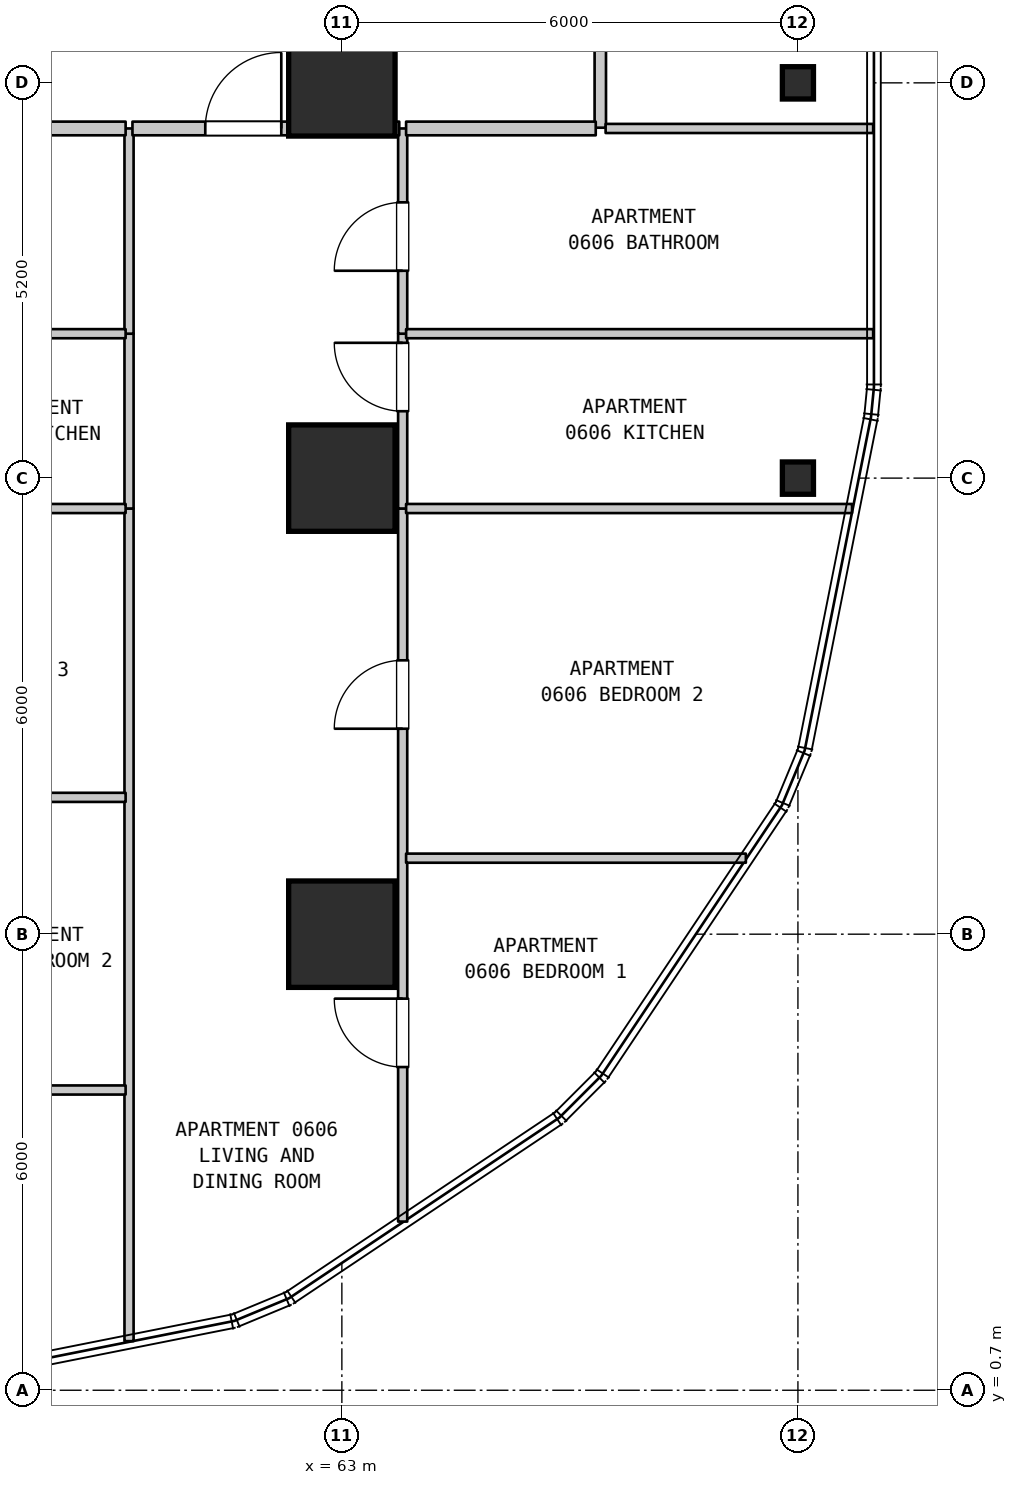
"""IFC4 building model, lengths in metres.
Left out: names, types, materials, properties, quantities, classifications, styles, units other than length and angle.
Written with IfcOpenShell. Run it as: python <this file> out.ifc"""

import sys

from ifc_helpers import new_model, si_unit, direction, frame, frame_2d, origin, origin_2d, place, context, subcontext, project, spatial, rectangle, i_section, extrude, element, fill, save


model = new_model("IFC4")
c1 = context("Model", 3, precision=1e-05, world=origin(), true_north=direction((0.0, 1.0)))
c2 = subcontext(c1, "Body", "Model", "MODEL_VIEW")
j1 = project(units=[si_unit("LENGTHUNIT", "METRE"), si_unit("PLANEANGLEUNIT", "RADIAN")], contexts=[c1])
p1 = place(None, origin())
s1 = spatial("IfcSite", under=j1, at=p1, CompositionType="ELEMENT")
p2 = place(p1, origin())
s2 = spatial("IfcBuilding", under=s1, at=p2, CompositionType="ELEMENT")
p3 = place(p2, frame((0.0, 0.0, 31.4)))
s3 = spatial("IfcBuildingStorey", under=s2, at=p3, CompositionType="ELEMENT", Elevation=31.4)
for number, where, z_axis, x_axis in (
    (1, (63.0, 6.7, 0.0), (0.0, 0.0, 1.0), (1.0, 0.0, 0.0)),
    (2, (63.0, 12.7, 0.0), (0.0, 0.0, 1.0), (1.0, 0.0, 0.0)),
    (3, (63.0, 17.9, 0.0), (0.0, 0.0, 1.0), (1.0, 0.0, 0.0)),
):
    element("IfcColumn", number, at=place(p3, frame(where, z_axis=z_axis, x_axis=x_axis)), inside=s3, PredefinedType="COLUMN", context=c2, shape_type="SweptSolid", body=[
        extrude(rectangle(XDim=1.4, YDim=1.4, at=origin_2d()), origin(), (0.0, 0.0, 1.0), 3.7),
    ])
for number, where, z_axis, x_axis in (
    (4, (69.0, 12.7, 0.0), (0.0, 0.0, 1.0), (1.0, 0.0, 0.0)),
    (5, (69.0, 17.9, 0.0), (0.0, 0.0, 1.0), (1.0, 0.0, 0.0)),
):
    element("IfcColumn", number, at=place(p3, frame(where, z_axis=z_axis, x_axis=x_axis)), inside=s3, PredefinedType="COLUMN", context=c2, shape_type="SweptSolid", body=[
        extrude(i_section(OverallWidth=0.409, OverallDepth=0.425, WebThickness=0.032, FlangeThickness=0.052, FilletRadius=0.015, at=origin_2d()), origin(), (0.0, 0.0, 1.0), 3.7),
    ])
p4 = place(p3, frame((60.2, 1.346, 0.0), z_axis=(0.0, 0.0, 1.0), x_axis=(0.0, 1.0, 0.0)))
e6 = element("IfcWall", 6, at=p4, inside=s3, PredefinedType="PARTITIONING", context=c2, shape_type="SweptSolid", body=[
    extrude(rectangle(XDim=10.954, YDim=0.12, at=frame_2d((5.477, 0.0))), origin(), (0.0, 0.0, 1.0), 3.385),
])
p5 = place(p3, frame((60.2, 12.3, 0.0), z_axis=(0.0, 0.0, 1.0), x_axis=(0.0, 1.0, 0.0)))
e7 = element("IfcWall", 7, at=p5, inside=s3, PredefinedType="PARTITIONING", context=c2, shape_type="SweptSolid", body=[
    extrude(rectangle(XDim=2.3, YDim=0.12, at=frame_2d((1.15, 0.0))), origin(), (0.0, 0.0, 1.0), 3.385),
])
p6 = place(p3, frame((60.2, 14.6, 0.0), z_axis=(0.0, 0.0, 1.0), x_axis=(0.0, 1.0, 0.0)))
e8 = element("IfcWall", 8, at=p6, inside=s3, PredefinedType="PARTITIONING", context=c2, shape_type="SweptSolid", body=[
    extrude(rectangle(XDim=2.7, YDim=0.12, at=frame_2d((1.35, 0.0))), origin(), (0.0, 0.0, 1.0), 3.385),
])
p7 = place(p3, frame((63.8, 2.919, 0.0), z_axis=(0.0, 0.0, 1.0), x_axis=(0.0, 1.0, 0.0)))
e9 = element("IfcWall", 9, at=p7, inside=s3, PredefinedType="PARTITIONING", context=c2, shape_type="SweptSolid", body=[
    extrude(rectangle(XDim=9.381, YDim=0.12, at=frame_2d((4.69, 0.0))), origin(), (0.0, 0.0, 1.0), 3.385),
])
p8 = place(p7, frame((2.033, 0.0, 0.0)))
e10 = element("IfcOpeningElement", 10, at=p8, cuts=e9, PredefinedType="OPENING", context=c2, shape_type="SweptSolid", body=[
    extrude(rectangle(XDim=0.9, YDim=2.15, at=frame_2d((0.45, 1.075))), frame((0.0, 0.07, 0.0), z_axis=(0.0, -1.0, 0.0), x_axis=(1.0, 0.0, 0.0)), (0.0, 0.0, 1.0), 0.14),
])
p9 = place(p7, frame((6.484, 0.0, 0.0)))
e11 = element("IfcOpeningElement", 11, at=p9, cuts=e9, PredefinedType="OPENING", context=c2, shape_type="SweptSolid", body=[
    extrude(rectangle(XDim=0.9, YDim=2.15, at=frame_2d((0.45, 1.075))), frame((0.0, 0.07, 0.0), z_axis=(0.0, -1.0, 0.0), x_axis=(1.0, 0.0, 0.0)), (0.0, 0.0, 1.0), 0.14),
])
p10 = place(p3, frame((63.8, 12.3, 0.0), z_axis=(0.0, 0.0, 1.0), x_axis=(0.0, 1.0, 0.0)))
e12 = element("IfcWall", 12, at=p10, inside=s3, PredefinedType="PARTITIONING", context=c2, shape_type="SweptSolid", body=[
    extrude(rectangle(XDim=2.3, YDim=0.12, at=frame_2d((1.15, 0.0))), origin(), (0.0, 0.0, 1.0), 3.385),
])
p11 = place(p10, frame((1.28, 0.0, 0.0)))
e13 = element("IfcOpeningElement", 13, at=p11, cuts=e12, PredefinedType="OPENING", context=c2, shape_type="SweptSolid", body=[
    extrude(rectangle(XDim=0.9, YDim=2.15, at=frame_2d((0.45, 1.075))), frame((0.0, 0.07, 0.0), z_axis=(0.0, -1.0, 0.0), x_axis=(1.0, 0.0, 0.0)), (0.0, 0.0, 1.0), 0.14),
])
p12 = place(p3, frame((63.8, 14.6, 0.0), z_axis=(0.0, 0.0, 1.0), x_axis=(0.0, 1.0, 0.0)))
e14 = element("IfcWall", 14, at=p12, inside=s3, PredefinedType="PARTITIONING", context=c2, shape_type="SweptSolid", body=[
    extrude(rectangle(XDim=2.7, YDim=0.12, at=frame_2d((1.35, 0.0))), origin(), (0.0, 0.0, 1.0), 3.385),
])
p13 = place(p12, frame((0.828, 0.0, 0.0)))
e15 = element("IfcOpeningElement", 15, at=p13, cuts=e14, PredefinedType="OPENING", context=c2, shape_type="SweptSolid", body=[
    extrude(rectangle(XDim=0.9, YDim=2.1, at=frame_2d((0.45, 1.05))), frame((0.0, 0.07, 0.0), z_axis=(0.0, -1.0, 0.0), x_axis=(1.0, 0.0, 0.0)), (0.0, 0.0, 1.0), 0.14),
])
p14 = place(p3, frame((66.4, 17.31, 0.0), z_axis=(0.0, 0.0, 1.0), x_axis=(0.0, 1.0, 0.0)))
e16 = element("IfcWall", 16, at=p14, inside=s3, PredefinedType="STANDARD", context=c2, shape_type="SweptSolid", body=[
    extrude(rectangle(XDim=2.34, YDim=0.15, at=frame_2d((1.17, 0.0))), origin(), (0.0, 0.0, 1.0), 3.385),
])
p15 = place(p3, frame((54.115, 4.65, 0.0), z_axis=(0.0, 0.0, 1.0), x_axis=(1.0, 0.0, 0.0)))
e17 = element("IfcWall", 17, at=p15, inside=s3, PredefinedType="PARTITIONING", context=c2, shape_type="SweptSolid", body=[
    extrude(rectangle(XDim=6.04, YDim=0.12, at=frame_2d((3.02, 0.0))), origin(), (0.0, 0.0, 1.0), 3.385),
])
p16 = place(p3, frame((63.845, 7.7, 0.0), z_axis=(0.0, 0.0, 1.0), x_axis=(1.0, 0.0, 0.0)))
e18 = element("IfcWall", 18, at=p16, inside=s3, PredefinedType="PARTITIONING", context=c2, shape_type="SweptSolid", body=[
    extrude(rectangle(XDim=4.47, YDim=0.12, at=frame_2d((2.235, 0.0))), origin(), (0.0, 0.0, 1.0), 3.385),
])
for number, where, z_axis, x_axis in (
    (19, (54.115, 8.5, 0.0), (0.0, 0.0, 1.0), (1.0, 0.0, 0.0)),
    (20, (54.115, 12.3, 0.0), (0.0, 0.0, 1.0), (1.0, 0.0, 0.0)),
):
    element("IfcWall", number, at=place(p3, frame(where, z_axis=z_axis, x_axis=x_axis)), inside=s3, PredefinedType="PARTITIONING", context=c2, shape_type="SweptSolid", body=[
        extrude(rectangle(XDim=6.04, YDim=0.12, at=frame_2d((3.02, 0.0))), origin(), (0.0, 0.0, 1.0), 3.385),
    ])
p17 = place(p3, frame((63.845, 12.3, 0.0), z_axis=(0.0, 0.0, 1.0), x_axis=(1.0, 0.0, 0.0)))
e21 = element("IfcWall", 21, at=p17, inside=s3, PredefinedType="PARTITIONING", context=c2, shape_type="SweptSolid", body=[
    extrude(rectangle(XDim=5.867, YDim=0.12, at=frame_2d((2.934, 0.0))), origin(), (0.0, 0.0, 1.0), 3.385),
])
p18 = place(p3, frame((54.115, 14.6, 0.0), z_axis=(0.0, 0.0, 1.0), x_axis=(1.0, 0.0, 0.0)))
e22 = element("IfcWall", 22, at=p18, inside=s3, PredefinedType="PARTITIONING", context=c2, shape_type="SweptSolid", body=[
    extrude(rectangle(XDim=6.04, YDim=0.12, at=frame_2d((3.02, 0.0))), origin(), (0.0, 0.0, 1.0), 3.385),
])
p19 = place(p3, frame((63.845, 14.6, 0.0), z_axis=(0.0, 0.0, 1.0), x_axis=(1.0, 0.0, 0.0)))
e23 = element("IfcWall", 23, at=p19, inside=s3, PredefinedType="PARTITIONING", context=c2, shape_type="SweptSolid", body=[
    extrude(rectangle(XDim=6.145, YDim=0.12, at=frame_2d((3.073, 0.0))), origin(), (0.0, 0.0, 1.0), 3.385),
])
p20 = place(p3, frame((54.115, 17.3, 0.0), z_axis=(0.0, 0.0, 1.0), x_axis=(1.0, 0.0, 0.0)))
e24 = element("IfcWall", 24, at=p20, inside=s3, PredefinedType="STANDARD", context=c2, shape_type="SweptSolid", body=[
    extrude(rectangle(XDim=6.04, YDim=0.18, at=frame_2d((3.02, 0.0))), origin(), (0.0, 0.0, 1.0), 3.385),
])
p21 = place(p3, frame((60.245, 17.3, 0.0), z_axis=(0.0, 0.0, 1.0), x_axis=(1.0, 0.0, 0.0)))
e25 = element("IfcWall", 25, at=p21, inside=s3, PredefinedType="STANDARD", context=c2, shape_type="SweptSolid", body=[
    extrude(rectangle(XDim=3.51, YDim=0.18, at=frame_2d((1.755, 0.0))), origin(), (0.0, 0.0, 1.0), 3.385),
])
p22 = place(p21, frame((0.958, 0.0, 0.0)))
e26 = element("IfcOpeningElement", 26, at=p22, cuts=e25, PredefinedType="OPENING", context=c2, shape_type="SweptSolid", body=[
    extrude(rectangle(XDim=1.0, YDim=2.15, at=frame_2d((0.5, 1.075))), frame((0.0, 0.1, 0.0), z_axis=(0.0, -1.0, 0.0), x_axis=(1.0, 0.0, 0.0)), (0.0, 0.0, 1.0), 0.2),
])
p23 = place(p3, frame((63.845, 17.3, 0.0), z_axis=(0.0, 0.0, 1.0), x_axis=(1.0, 0.0, 0.0)))
e27 = element("IfcWall", 27, at=p23, inside=s3, PredefinedType="STANDARD", context=c2, shape_type="SweptSolid", body=[
    extrude(rectangle(XDim=2.495, YDim=0.18, at=frame_2d((1.248, 0.0))), origin(), (0.0, 0.0, 1.0), 3.385),
])
p24 = place(p3, frame((66.47, 17.3, 0.0), z_axis=(0.0, 0.0, 1.0), x_axis=(1.0, 0.0, 0.0)))
e28 = element("IfcWall", 28, at=p24, inside=s3, PredefinedType="PARTITIONING", context=c2, shape_type="SweptSolid", body=[
    extrude(rectangle(XDim=3.52, YDim=0.12, at=frame_2d((1.76, 0.0))), origin(), (0.0, 0.0, 1.0), 3.385),
])
p25 = place(p8, origin())
e29 = element("IfcDoor", 29, at=p25, inside=s3, OperationType="SINGLE_SWING_RIGHT", PredefinedType="DOOR", context=c2, shape_type="SweptSolid", body=[
    extrude(rectangle(XDim=0.9, YDim=2.15, at=frame_2d((0.45, 1.075))), frame((0.0, 0.025, 0.0), z_axis=(0.0, -1.0, 0.0), x_axis=(1.0, 0.0, 0.0)), (0.0, 0.0, 1.0), 0.05),
])
fill(e10, e29)
p26 = place(p9, origin())
e30 = element("IfcDoor", 30, at=p26, inside=s3, OperationType="SINGLE_SWING_LEFT", PredefinedType="DOOR", context=c2, shape_type="SweptSolid", body=[
    extrude(rectangle(XDim=0.9, YDim=2.15, at=frame_2d((0.45, 1.075))), frame((0.0, 0.025, 0.0), z_axis=(0.0, -1.0, 0.0), x_axis=(1.0, 0.0, 0.0)), (0.0, 0.0, 1.0), 0.05),
])
fill(e11, e30)
p27 = place(p11, origin())
e31 = element("IfcDoor", 31, at=p27, inside=s3, OperationType="SINGLE_SWING_RIGHT", PredefinedType="DOOR", context=c2, shape_type="SweptSolid", body=[
    extrude(rectangle(XDim=0.9, YDim=2.15, at=frame_2d((0.45, 1.075))), frame((0.0, 0.025, 0.0), z_axis=(0.0, -1.0, 0.0), x_axis=(1.0, 0.0, 0.0)), (0.0, 0.0, 1.0), 0.05),
])
fill(e13, e31)
p28 = place(p13, origin())
e32 = element("IfcDoor", 32, at=p28, inside=s3, OperationType="SINGLE_SWING_LEFT", PredefinedType="DOOR", context=c2, shape_type="SweptSolid", body=[
    extrude(rectangle(XDim=0.9, YDim=2.1, at=frame_2d((0.45, 1.05))), frame((0.0, 0.025, 0.0), z_axis=(0.0, -1.0, 0.0), x_axis=(1.0, 0.0, 0.0)), (0.0, 0.0, 1.0), 0.05),
])
fill(e15, e32)
p29 = place(p22, origin())
e33 = element("IfcDoor", 33, at=p29, inside=s3, OperationType="SINGLE_SWING_RIGHT", PredefinedType="DOOR", context=c2, shape_type="SweptSolid", body=[
    extrude(rectangle(XDim=1.0, YDim=2.15, at=frame_2d((0.5, 1.075))), frame((0.0, 0.025, 0.0), z_axis=(0.0, -1.0, 0.0), x_axis=(1.0, 0.0, 0.0)), (0.0, 0.0, 1.0), 0.05),
])
fill(e26, e33)
save(model, sys.argv[1])
